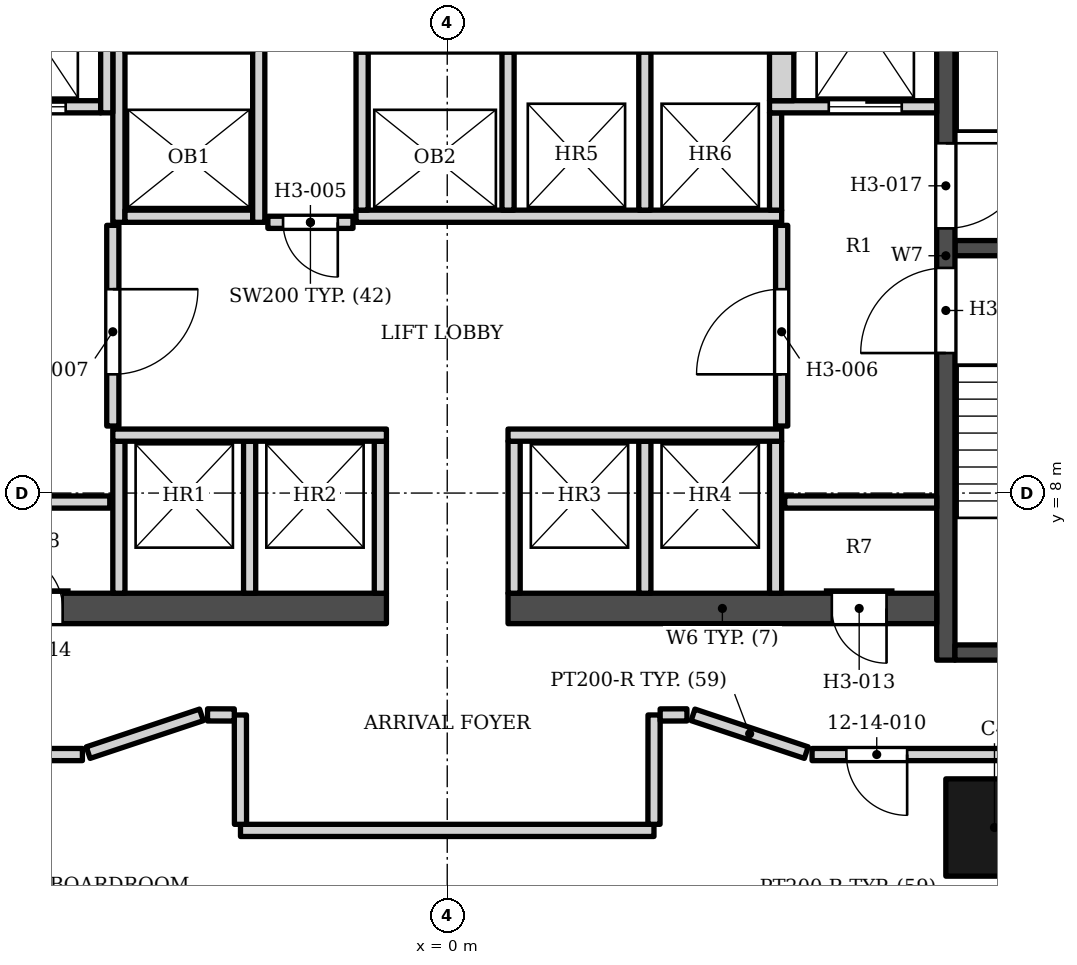
"""IFC4 building model, lengths in metres.
Left out: names, types, materials, properties, quantities, classifications, styles, units other than length and angle.
Written with IfcOpenShell. Run it as: python <this file> out.ifc"""

import sys

from ifc_helpers import new_model, si_unit, direction, frame, frame_2d, origin, origin_2d, place, context, subcontext, project, spatial, rectangle, extrude, element, fill, save


model = new_model("IFC4")
c1 = context("Model", 3, precision=1e-05, world=origin(), true_north=direction((0.0, 1.0)))
c2 = subcontext(c1, "Body", "Model", "MODEL_VIEW")
j1 = project(units=[si_unit("LENGTHUNIT", "METRE"), si_unit("PLANEANGLEUNIT", "RADIAN")], contexts=[c1])
p1 = place(None, origin())
s1 = spatial("IfcSite", under=j1, at=p1, CompositionType="ELEMENT")
p2 = place(p1, origin())
s2 = spatial("IfcBuilding", under=s1, at=p2, CompositionType="ELEMENT")
p3 = place(p2, frame((0.0, 0.0, 66.4)))
s3 = spatial("IfcBuildingStorey", under=s2, at=p3, CompositionType="ELEMENT", Elevation=66.4)
p4 = place(p3, frame((8.2, 5.253, 0.0), z_axis=(0.0, 0.0, 1.0), x_axis=(0.0, 1.0, 0.0)))
e1 = element("IfcWall", 1, at=p4, inside=s3, PredefinedType="SHEAR", context=c2, shape_type="SweptSolid", body=[
    extrude(rectangle(XDim=13.3, YDim=0.3, at=frame_2d((6.65, 0.0))), origin(), (0.0, 0.0, 1.0), 3.4),
])
p5 = place(p4, frame((7.1, 0.0, 0.0)))
e2 = element("IfcOpeningElement", 2, at=p5, cuts=e1, PredefinedType="OPENING", context=c2, shape_type="SweptSolid", body=[
    extrude(rectangle(XDim=1.4, YDim=2.1, at=frame_2d((0.7, 1.05))), frame((0.0, 0.16, 0.0), z_axis=(0.0, -1.0, 0.0), x_axis=(1.0, 0.0, 0.0)), (0.0, 0.0, 1.0), 0.32),
])
p6 = place(p4, frame((5.05, 0.0, 0.0)))
e3 = element("IfcOpeningElement", 3, at=p6, cuts=e1, PredefinedType="OPENING", context=c2, shape_type="SweptSolid", body=[
    extrude(rectangle(XDim=1.4, YDim=2.1, at=frame_2d((0.7, 1.05))), frame((0.0, 0.16, 0.0), z_axis=(0.0, -1.0, 0.0), x_axis=(1.0, 0.0, 0.0)), (0.0, 0.0, 1.0), 0.32),
])
for number, where, z_axis, x_axis in (
    (4, (8.35, 12.028, 0.0), (0.0, 0.0, 1.0), (1.0, 0.0, 0.0)),
    (5, (8.35, 5.378, 0.0), (0.0, 0.0, 1.0), (1.0, 0.0, 0.0)),
):
    element("IfcWall", number, at=place(p3, frame(where, z_axis=z_axis, x_axis=x_axis)), inside=s3, PredefinedType="SHEAR", context=c2, shape_type="SweptSolid", body=[
        extrude(rectangle(XDim=3.75, YDim=0.25, at=frame_2d((1.875, 0.0))), origin(), (0.0, 0.0, 1.0), 3.4),
    ])
p7 = place(p3, frame((-8.05, 6.103, 0.0), z_axis=(0.0, 0.0, 1.0), x_axis=(1.0, 0.0, 0.0)))
e6 = element("IfcWall", 6, at=p7, inside=s3, PredefinedType="SHEAR", context=c2, shape_type="SweptSolid", body=[
    extrude(rectangle(XDim=7.05, YDim=0.5, at=frame_2d((3.525, 0.0))), origin(), (0.0, 0.0, 1.0), 3.4),
])
p8 = place(p7, frame((0.825, 0.0, 0.0)))
e7 = element("IfcOpeningElement", 7, at=p8, cuts=e6, PredefinedType="OPENING", context=c2, shape_type="SweptSolid", body=[
    extrude(rectangle(XDim=0.9, YDim=2.1, at=frame_2d((0.45, 1.05))), frame((0.0, 0.26, 0.0), z_axis=(0.0, -1.0, 0.0), x_axis=(1.0, 0.0, 0.0)), (0.0, 0.0, 1.0), 0.52),
])
p9 = place(p3, frame((1.0, 6.103, 0.0), z_axis=(0.0, 0.0, 1.0), x_axis=(1.0, 0.0, 0.0)))
e8 = element("IfcWall", 8, at=p9, inside=s3, PredefinedType="SHEAR", context=c2, shape_type="SweptSolid", body=[
    extrude(rectangle(XDim=7.05, YDim=0.5, at=frame_2d((3.525, 0.0))), origin(), (0.0, 0.0, 1.0), 3.4),
])
p10 = place(p9, frame((5.325, 0.0, 0.0)))
e9 = element("IfcOpeningElement", 9, at=p10, cuts=e8, PredefinedType="OPENING", context=c2, shape_type="SweptSolid", body=[
    extrude(rectangle(XDim=0.9, YDim=2.1, at=frame_2d((0.45, 1.05))), frame((0.0, 0.26, 0.0), z_axis=(0.0, -1.0, 0.0), x_axis=(1.0, 0.0, 0.0)), (0.0, 0.0, 1.0), 0.52),
])
p11 = place(p3, frame((9.0, 2.5, 0.0), z_axis=(0.0, 0.0, 1.0), x_axis=(1.0, 0.0, 0.0)))
e10 = element("IfcColumn", 10, at=p11, inside=s3, PredefinedType="COLUMN", context=c2, shape_type="SweptSolid", body=[
    extrude(rectangle(XDim=1.6, YDim=1.6, at=origin_2d()), origin(), (0.0, 0.0, 1.0), 3.4),
])
for number, where, z_axis, x_axis in (
    (11, (-5.4, 6.353, 0.0), (0.0, 0.0, 1.0), (0.0, 1.0, 0.0)),
    (12, (-3.25, 6.353, 0.0), (0.0, 0.0, 1.0), (0.0, 1.0, 0.0)),
    (13, (-1.1, 6.353, 0.0), (0.0, 0.0, 1.0), (0.0, 1.0, 0.0)),
    (14, (1.1, 6.353, 0.0), (0.0, 0.0, 1.0), (0.0, 1.0, 0.0)),
    (15, (3.25, 6.353, 0.0), (0.0, 0.0, 1.0), (0.0, 1.0, 0.0)),
    (16, (5.4, 6.353, 0.0), (0.0, 0.0, 1.0), (0.0, 1.0, 0.0)),
    (17, (-8.05, 7.853, 0.0), (0.0, 0.0, 1.0), (1.0, 0.0, 0.0)),
    (18, (5.55, 7.853, 0.0), (0.0, 0.0, 1.0), (1.0, 0.0, 0.0)),
):
    element("IfcWall", number, at=place(p3, frame(where, z_axis=z_axis, x_axis=x_axis)), inside=s3, PredefinedType="SOLIDWALL", context=c2, shape_type="SweptSolid", body=[
        extrude(rectangle(XDim=2.5, YDim=0.2, at=frame_2d((1.25, 0.0))), origin(), (0.0, 0.0, 1.0), 3.23),
    ])
for number, where, z_axis, x_axis in (
    (19, (-5.5, 8.953, 0.0), (0.0, 0.0, 1.0), (1.0, 0.0, 0.0)),
    (20, (1.0, 8.953, 0.0), (0.0, 0.0, 1.0), (1.0, 0.0, 0.0)),
):
    element("IfcWall", number, at=place(p3, frame(where, z_axis=z_axis, x_axis=x_axis)), inside=s3, PredefinedType="SOLIDWALL", context=c2, shape_type="SweptSolid", body=[
        extrude(rectangle(XDim=4.5, YDim=0.2, at=frame_2d((2.25, 0.0))), origin(), (0.0, 0.0, 1.0), 3.23),
    ])
p12 = place(p3, frame((-5.5, 9.103, 0.0), z_axis=(0.0, 0.0, 1.0), x_axis=(0.0, 1.0, 0.0)))
e21 = element("IfcWall", 21, at=p12, inside=s3, PredefinedType="SOLIDWALL", context=c2, shape_type="SweptSolid", body=[
    extrude(rectangle(XDim=3.3, YDim=0.2, at=frame_2d((1.65, 0.0))), origin(), (0.0, 0.0, 1.0), 3.23),
])
p13 = place(p12, frame((0.85, 0.0, 0.0)))
e22 = element("IfcOpeningElement", 22, at=p13, cuts=e21, PredefinedType="OPENING", context=c2, shape_type="SweptSolid", body=[
    extrude(rectangle(XDim=1.4, YDim=2.1, at=frame_2d((0.7, 1.05))), frame((0.0, 0.11, 0.0), z_axis=(0.0, -1.0, 0.0), x_axis=(1.0, 0.0, 0.0)), (0.0, 0.0, 1.0), 0.22),
])
p14 = place(p3, frame((5.5, 9.103, 0.0), z_axis=(0.0, 0.0, 1.0), x_axis=(0.0, 1.0, 0.0)))
e23 = element("IfcWall", 23, at=p14, inside=s3, PredefinedType="SOLIDWALL", context=c2, shape_type="SweptSolid", body=[
    extrude(rectangle(XDim=3.3, YDim=0.2, at=frame_2d((1.65, 0.0))), origin(), (0.0, 0.0, 1.0), 3.23),
])
p15 = place(p14, frame((0.85, 0.0, 0.0)))
e24 = element("IfcOpeningElement", 24, at=p15, cuts=e23, PredefinedType="OPENING", context=c2, shape_type="SweptSolid", body=[
    extrude(rectangle(XDim=1.4, YDim=2.1, at=frame_2d((0.7, 1.05))), frame((0.0, 0.11, 0.0), z_axis=(0.0, -1.0, 0.0), x_axis=(1.0, 0.0, 0.0)), (0.0, 0.0, 1.0), 0.22),
])
p16 = place(p3, frame((-2.95, 12.453, 0.0), z_axis=(0.0, 0.0, 1.0), x_axis=(1.0, 0.0, 0.0)))
e25 = element("IfcWall", 25, at=p16, inside=s3, PredefinedType="SOLIDWALL", context=c2, shape_type="SweptSolid", body=[
    extrude(rectangle(XDim=1.4, YDim=0.2, at=frame_2d((0.7, 0.0))), origin(), (0.0, 0.0, 1.0), 3.23),
])
p17 = place(p16, frame((0.25, 0.0, 0.0)))
e26 = element("IfcOpeningElement", 26, at=p17, cuts=e25, PredefinedType="OPENING", context=c2, shape_type="SweptSolid", body=[
    extrude(rectangle(XDim=0.9, YDim=2.1, at=frame_2d((0.45, 1.05))), frame((0.0, 0.11, 0.0), z_axis=(0.0, -1.0, 0.0), x_axis=(1.0, 0.0, 0.0)), (0.0, 0.0, 1.0), 0.22),
])
p18 = place(p3, frame((-5.4, 12.453, 0.0), z_axis=(0.0, 0.0, 1.0), x_axis=(0.0, 1.0, 0.0)))
e27 = element("IfcWall", 27, at=p18, inside=s3, PredefinedType="SOLIDWALL", context=c2, shape_type="SweptSolid", body=[
    extrude(rectangle(XDim=3.0, YDim=0.2, at=frame_2d((1.5, 0.0))), origin(), (0.0, 0.0, 1.0), 3.23),
])
p19 = place(p3, frame((-5.3, 12.552, 0.0), z_axis=(0.0, 0.0, 1.0), x_axis=(1.0, 0.0, 0.0)))
e28 = element("IfcWall", 28, at=p19, inside=s3, PredefinedType="SOLIDWALL", context=c2, shape_type="SweptSolid", body=[
    extrude(rectangle(XDim=2.1, YDim=0.2, at=frame_2d((1.05, 0.0))), origin(), (0.0, 0.0, 1.0), 3.23),
])
p20 = place(p3, frame((-3.1, 12.453, 0.0), z_axis=(0.0, 0.0, 1.0), x_axis=(0.0, 1.0, 0.0)))
e29 = element("IfcWall", 29, at=p20, inside=s3, PredefinedType="SOLIDWALL", context=c2, shape_type="SweptSolid", body=[
    extrude(rectangle(XDim=3.0, YDim=0.2, at=frame_2d((1.5, 0.0))), origin(), (0.0, 0.0, 1.0), 3.23),
])
p21 = place(p3, frame((-1.5, 12.552, 0.0), z_axis=(0.0, 0.0, 1.0), x_axis=(1.0, 0.0, 0.0)))
e30 = element("IfcWall", 30, at=p21, inside=s3, PredefinedType="SOLIDWALL", context=c2, shape_type="SweptSolid", body=[
    extrude(rectangle(XDim=7.0, YDim=0.2, at=frame_2d((3.5, 0.0))), origin(), (0.0, 0.0, 1.0), 3.23),
])
for number, where, z_axis, x_axis in (
    (31, (-1.4, 12.653, 0.0), (0.0, 0.0, 1.0), (0.0, 1.0, 0.0)),
    (32, (1.0, 12.653, 0.0), (0.0, 0.0, 1.0), (0.0, 1.0, 0.0)),
    (33, (3.25, 12.653, 0.0), (0.0, 0.0, 1.0), (0.0, 1.0, 0.0)),
):
    element("IfcWall", number, at=place(p3, frame(where, z_axis=z_axis, x_axis=x_axis)), inside=s3, PredefinedType="SOLIDWALL", context=c2, shape_type="SweptSolid", body=[
        extrude(rectangle(XDim=2.6, YDim=0.2, at=frame_2d((1.3, 0.0))), origin(), (0.0, 0.0, 1.0), 3.23),
    ])
p22 = place(p3, frame((5.4, 12.653, 0.0), z_axis=(0.0, 0.0, 1.0), x_axis=(0.0, 1.0, 0.0)))
e34 = element("IfcWall", 34, at=p22, inside=s3, PredefinedType="SOLIDWALL", context=c2, shape_type="SweptSolid", body=[
    extrude(rectangle(XDim=1.6, YDim=0.2, at=frame_2d((0.8, 0.0))), origin(), (0.0, 0.0, 1.0), 3.23),
])
p23 = place(p3, frame((-8.05, 14.353, 0.0), z_axis=(0.0, 0.0, 1.0), x_axis=(1.0, 0.0, 0.0)))
e35 = element("IfcWall", 35, at=p23, inside=s3, PredefinedType="SOLIDWALL", context=c2, shape_type="SweptSolid", body=[
    extrude(rectangle(XDim=2.35, YDim=0.2, at=frame_2d((1.175, 0.0))), origin(), (0.0, 0.0, 1.0), 3.23),
])
p24 = place(p23, frame((0.575, 0.0, 0.0)))
e36 = element("IfcOpeningElement", 36, at=p24, cuts=e35, PredefinedType="OPENING", context=c2, shape_type="SweptSolid", body=[
    extrude(rectangle(XDim=1.2, YDim=2.1, at=frame_2d((0.6, 1.05))), frame((0.0, 0.11, 0.0), z_axis=(0.0, -1.0, 0.0), x_axis=(1.0, 0.0, 0.0)), (0.0, 0.0, 1.0), 0.22),
])
p25 = place(p3, frame((-5.6, 14.253, 0.0), z_axis=(0.0, 0.0, 1.0), x_axis=(0.0, 1.0, 0.0)))
e37 = element("IfcWall", 37, at=p25, inside=s3, PredefinedType="SOLIDWALL", context=c2, shape_type="SweptSolid", body=[
    extrude(rectangle(XDim=4.3, YDim=0.2, at=frame_2d((2.15, 0.0))), origin(), (0.0, 0.0, 1.0), 3.23),
])
p26 = place(p3, frame((5.3, 14.353, 0.0), z_axis=(0.0, 0.0, 1.0), x_axis=(1.0, 0.0, 0.0)))
e38 = element("IfcWall", 38, at=p26, inside=s3, PredefinedType="SOLIDWALL", context=c2, shape_type="SweptSolid", body=[
    extrude(rectangle(XDim=2.75, YDim=0.2, at=frame_2d((1.375, 0.0))), origin(), (0.0, 0.0, 1.0), 3.23),
])
p27 = place(p26, frame((0.975, 0.0, 0.0)))
e39 = element("IfcOpeningElement", 39, at=p27, cuts=e38, PredefinedType="OPENING", context=c2, shape_type="SweptSolid", body=[
    extrude(rectangle(XDim=1.2, YDim=2.1, at=frame_2d((0.6, 1.05))), frame((0.0, 0.11, 0.0), z_axis=(0.0, -1.0, 0.0), x_axis=(1.0, 0.0, 0.0)), (0.0, 0.0, 1.0), 0.22),
])
p28 = place(p3, frame((5.5, 14.453, 0.0), z_axis=(0.0, 0.0, 1.0), x_axis=(0.0, 1.0, 0.0)))
e40 = element("IfcWall", 40, at=p28, inside=s3, PredefinedType="SOLIDWALL", context=c2, shape_type="SweptSolid", body=[
    extrude(rectangle(XDim=0.8, YDim=0.4, at=frame_2d((0.4, 0.0))), origin(), (0.0, 0.0, 1.0), 3.23),
])
p29 = place(p3, frame((-5.3, 15.353, 0.0), z_axis=(0.0, 0.0, 1.0), x_axis=(1.0, 0.0, 0.0)))
e41 = element("IfcWall", 41, at=p29, inside=s3, PredefinedType="SOLIDWALL", context=c2, shape_type="SweptSolid", body=[
    extrude(rectangle(XDim=2.1, YDim=0.2, at=frame_2d((1.05, 0.0))), origin(), (0.0, 0.0, 1.0), 3.23),
])
p30 = place(p3, frame((-1.5, 15.353, 0.0), z_axis=(0.0, 0.0, 1.0), x_axis=(1.0, 0.0, 0.0)))
e42 = element("IfcWall", 42, at=p30, inside=s3, PredefinedType="SOLIDWALL", context=c2, shape_type="SweptSolid", body=[
    extrude(rectangle(XDim=7.2, YDim=0.2, at=frame_2d((3.6, 0.0))), origin(), (0.0, 0.0, 1.0), 3.23),
])
p31 = place(p3, frame((-12.043, 2.017, 0.0), z_axis=(0.0, 0.0, 1.0), x_axis=(0.5000018851, -0.866024315419, 0.0)))
e43 = element("IfcWall", 43, at=p31, inside=s3, PredefinedType="PARTITIONING", context=c2, shape_type="SweptSolid", body=[
    extrude(rectangle(XDim=18.0, YDim=0.2, at=frame_2d((9.0, 0.0))), origin(), (0.0, 0.0, 1.0), 2.374),
])
p32 = place(p31, frame((5.95, 0.0, 0.0)))
e44 = element("IfcOpeningElement", 44, at=p32, cuts=e43, PredefinedType="OPENING", context=c2, shape_type="SweptSolid", body=[
    extrude(rectangle(XDim=1.6, YDim=2.1, at=frame_2d((0.8, 1.05))), frame((0.0, 0.11, 0.0), z_axis=(0.0, -1.0, 0.0), x_axis=(1.0, 0.0, 0.0)), (0.0, 0.0, 1.0), 0.22),
])
p33 = place(p31, frame((14.0, 0.0, 0.0)))
e45 = element("IfcOpeningElement", 45, at=p33, cuts=e43, PredefinedType="OPENING", context=c2, shape_type="SweptSolid", body=[
    extrude(rectangle(XDim=1.1, YDim=2.1, at=frame_2d((0.55, 1.05))), frame((0.0, 0.11, 0.0), z_axis=(0.0, -1.0, 0.0), x_axis=(1.0, 0.0, 0.0)), (0.0, 0.0, 1.0), 0.22),
])
p34 = place(p3, frame((8.824, -0.617, 0.0), z_axis=(0.0, 0.0, 1.0), x_axis=(0.500271769931, 0.865868440475, 0.0)))
e46 = element("IfcWall", 46, at=p34, inside=s3, PredefinedType="PARTITIONING", context=c2, shape_type="SweptSolid", body=[
    extrude(rectangle(XDim=4.885, YDim=0.2, at=frame_2d((2.443, 0.0))), origin(), (0.0, 0.0, 1.0), 2.552),
])
p35 = place(p3, frame((-3.4, 2.452, 0.0), z_axis=(0.0, 0.0, 1.0), x_axis=(1.0, 0.0, 0.0)))
e47 = element("IfcWall", 47, at=p35, inside=s3, PredefinedType="PARTITIONING", context=c2, shape_type="SweptSolid", body=[
    extrude(rectangle(XDim=6.8, YDim=0.2, at=frame_2d((3.4, 0.0))), origin(), (0.0, 0.0, 1.0), 2.474),
])
p36 = place(p3, frame((-3.402, 4.351, 0.0), z_axis=(0.0, 0.0, 1.0), x_axis=(0.001086217961, -0.999999410065, 0.0)))
e48 = element("IfcWall", 48, at=p36, inside=s3, PredefinedType="PARTITIONING", context=c2, shape_type="SweptSolid", body=[
    extrude(rectangle(XDim=1.798, YDim=0.2, at=frame_2d((0.899, 0.0))), origin(), (0.0, 0.0, 1.0), 3.23),
])
p37 = place(p3, frame((2.686, -14.257, 0.0), z_axis=(0.0, 0.0, 1.0), x_axis=(0.49998850195, 0.866032042085, 0.0)))
e49 = element("IfcWall", 49, at=p37, inside=s3, PredefinedType="PARTITIONING", context=c2, shape_type="SweptSolid", body=[
    extrude(rectangle(XDim=20.6, YDim=0.2, at=frame_2d((10.3, 0.0))), origin(), (0.0, 0.0, 1.0), 2.302),
])
p38 = place(p37, frame((9.7, 0.0, 0.0)))
e50 = element("IfcOpeningElement", 50, at=p38, cuts=e49, PredefinedType="OPENING", context=c2, shape_type="SweptSolid", body=[
    extrude(rectangle(XDim=1.1, YDim=2.1, at=frame_2d((0.55, 1.05))), frame((0.0, 0.11, 0.0), z_axis=(0.0, -1.0, 0.0), x_axis=(1.0, 0.0, 0.0)), (0.0, 0.0, 1.0), 0.22),
])
p39 = place(p37, frame((15.6, 0.0, 0.0)))
e51 = element("IfcOpeningElement", 51, at=p39, cuts=e49, PredefinedType="OPENING", context=c2, shape_type="SweptSolid", body=[
    extrude(rectangle(XDim=1.0, YDim=2.1, at=frame_2d((0.5, 1.05))), frame((0.0, 0.11, 0.0), z_axis=(0.0, -1.0, 0.0), x_axis=(1.0, 0.0, 0.0)), (0.0, 0.0, 1.0), 0.22),
])
p40 = place(p3, frame((-11.28, 3.7, 0.0), z_axis=(0.0, 0.0, 1.0), x_axis=(1.0, 0.0, 0.0)))
e52 = element("IfcWall", 52, at=p40, inside=s3, PredefinedType="PARTITIONING", context=c2, shape_type="SweptSolid", body=[
    extrude(rectangle(XDim=5.28, YDim=0.2, at=frame_2d((2.64, 0.0))), origin(), (0.0, 0.0, 1.0), 2.832),
])
p41 = place(p3, frame((6.0, 3.7, 0.0), z_axis=(0.0, 0.0, 1.0), x_axis=(1.0, 0.0, 0.0)))
e53 = element("IfcWall", 53, at=p41, inside=s3, PredefinedType="PARTITIONING", context=c2, shape_type="SweptSolid", body=[
    extrude(rectangle(XDim=5.319, YDim=0.2, at=frame_2d((2.659, 0.0))), origin(), (0.0, 0.0, 1.0), 2.832),
])
p42 = place(p41, frame((0.564, 0.0, 0.0)))
e54 = element("IfcOpeningElement", 54, at=p42, cuts=e53, PredefinedType="OPENING", context=c2, shape_type="SweptSolid", body=[
    extrude(rectangle(XDim=1.0, YDim=2.1, at=frame_2d((0.5, 1.05))), frame((0.0, 0.11, 0.0), z_axis=(0.0, -1.0, 0.0), x_axis=(1.0, 0.0, 0.0)), (0.0, 0.0, 1.0), 0.22),
])
p43 = place(p41, frame((3.95, 0.0, 0.0)))
e55 = element("IfcOpeningElement", 55, at=p43, cuts=e53, PredefinedType="OPENING", context=c2, shape_type="SweptSolid", body=[
    extrude(rectangle(XDim=1.0, YDim=2.1, at=frame_2d((0.5, 1.05))), frame((0.0, 0.11, 0.0), z_axis=(0.0, -1.0, 0.0), x_axis=(1.0, 0.0, 0.0)), (0.0, 0.0, 1.0), 0.22),
])
for number, where, z_axis, x_axis in (
    (56, (4.042, 4.352, 0.0), (0.0, 0.0, 1.0), (0.949, -0.316, 0.0)),
    (57, (-5.905, 3.731, 0.0), (0.0, 0.0, 1.0), (0.949, 0.316, 0.0)),
):
    element("IfcWall", number, at=place(p3, frame(where, z_axis=z_axis, x_axis=x_axis)), inside=s3, PredefinedType="PARTITIONING", context=c2, shape_type="SweptSolid", body=[
        extrude(rectangle(XDim=1.964, YDim=0.2, at=frame_2d((0.982, 0.0))), origin(), (0.0, 0.0, 1.0), 2.384),
    ])
p44 = place(p3, frame((-3.942, 4.352, 0.0), z_axis=(0.0, 0.0, 1.0), x_axis=(0.999996159087, -0.00277160798, 0.0)))
e58 = element("IfcWall", 58, at=p44, inside=s3, PredefinedType="PARTITIONING", context=c2, shape_type="SweptSolid", body=[
    extrude(rectangle(XDim=0.44, YDim=0.2, at=frame_2d((0.22, 0.0))), origin(), (0.0, 0.0, 1.0), 3.23),
])
p45 = place(p3, frame((3.4, 2.552, 0.0), z_axis=(0.0, 0.0, 1.0), x_axis=(0.001086217961, 0.999999410065, 0.0)))
e59 = element("IfcWall", 59, at=p45, inside=s3, PredefinedType="PARTITIONING", context=c2, shape_type="SweptSolid", body=[
    extrude(rectangle(XDim=1.798, YDim=0.2, at=frame_2d((0.899, 0.0))), origin(), (0.0, 0.0, 1.0), 3.23),
])
p46 = place(p3, frame((3.502, 4.351, 0.0), z_axis=(0.0, 0.0, 1.0), x_axis=(0.999996159087, 0.00277160798, 0.0)))
e60 = element("IfcWall", 60, at=p46, inside=s3, PredefinedType="PARTITIONING", context=c2, shape_type="SweptSolid", body=[
    extrude(rectangle(XDim=0.44, YDim=0.2, at=frame_2d((0.22, 0.0))), origin(), (0.0, 0.0, 1.0), 3.23),
])
p47 = place(p24, origin())
e61 = element("IfcDoor", 61, at=p47, inside=s3, OperationType="DOUBLE_DOOR_SLIDING", PredefinedType="DOOR", context=c2, shape_type="SweptSolid", body=[
    extrude(rectangle(XDim=1.2, YDim=2.1, at=frame_2d((0.6, 1.05))), frame((0.0, 0.025, 0.0), z_axis=(0.0, -1.0, 0.0), x_axis=(1.0, 0.0, 0.0)), (0.0, 0.0, 1.0), 0.05),
])
fill(e36, e61)
p48 = place(p27, origin())
e62 = element("IfcDoor", 62, at=p48, inside=s3, OperationType="DOUBLE_DOOR_SLIDING", PredefinedType="DOOR", context=c2, shape_type="SweptSolid", body=[
    extrude(rectangle(XDim=1.2, YDim=2.1, at=frame_2d((0.6, 1.05))), frame((0.0, 0.025, 0.0), z_axis=(0.0, -1.0, 0.0), x_axis=(1.0, 0.0, 0.0)), (0.0, 0.0, 1.0), 0.05),
])
fill(e39, e62)
p49 = place(p5, origin())
e63 = element("IfcDoor", 63, at=p49, inside=s3, OperationType="SINGLE_SWING_RIGHT", PredefinedType="DOOR", context=c2, shape_type="SweptSolid", body=[
    extrude(rectangle(XDim=1.4, YDim=2.1, at=frame_2d((0.7, 1.05))), frame((0.0, 0.025, 0.0), z_axis=(0.0, -1.0, 0.0), x_axis=(1.0, 0.0, 0.0)), (0.0, 0.0, 1.0), 0.05),
])
fill(e2, e63)
p50 = place(p6, origin())
e64 = element("IfcDoor", 64, at=p50, inside=s3, OperationType="SINGLE_SWING_LEFT", PredefinedType="DOOR", context=c2, shape_type="SweptSolid", body=[
    extrude(rectangle(XDim=1.4, YDim=2.1, at=frame_2d((0.7, 1.05))), frame((0.0, 0.025, 0.0), z_axis=(0.0, -1.0, 0.0), x_axis=(1.0, 0.0, 0.0)), (0.0, 0.0, 1.0), 0.05),
])
fill(e3, e64)
p51 = place(p17, origin())
e65 = element("IfcDoor", 65, at=p51, inside=s3, OperationType="SINGLE_SWING_RIGHT", PredefinedType="DOOR", context=c2, shape_type="SweptSolid", body=[
    extrude(rectangle(XDim=0.9, YDim=2.1, at=frame_2d((0.45, 1.05))), frame((0.0, 0.025, 0.0), z_axis=(0.0, -1.0, 0.0), x_axis=(1.0, 0.0, 0.0)), (0.0, 0.0, 1.0), 0.05),
])
fill(e26, e65)
p52 = place(p13, origin())
e66 = element("IfcDoor", 66, at=p52, inside=s3, OperationType="SINGLE_SWING_RIGHT", PredefinedType="DOOR", context=c2, shape_type="SweptSolid", body=[
    extrude(rectangle(XDim=1.4, YDim=2.1, at=frame_2d((0.7, 1.05))), frame((0.0, 0.025, 0.0), z_axis=(0.0, -1.0, 0.0), x_axis=(1.0, 0.0, 0.0)), (0.0, 0.0, 1.0), 0.05),
])
fill(e22, e66)
p53 = place(p15, origin())
e67 = element("IfcDoor", 67, at=p53, inside=s3, OperationType="SINGLE_SWING_LEFT", PredefinedType="DOOR", context=c2, shape_type="SweptSolid", body=[
    extrude(rectangle(XDim=1.4, YDim=2.1, at=frame_2d((0.7, 1.05))), frame((0.0, 0.025, 0.0), z_axis=(0.0, -1.0, 0.0), x_axis=(1.0, 0.0, 0.0)), (0.0, 0.0, 1.0), 0.05),
])
fill(e24, e67)
p54 = place(p8, origin())
e68 = element("IfcDoor", 68, at=p54, inside=s3, OperationType="SINGLE_SWING_LEFT", PredefinedType="DOOR", context=c2, shape_type="SweptSolid", body=[
    extrude(rectangle(XDim=0.9, YDim=2.1, at=frame_2d((0.45, 1.05))), frame((0.0, 0.025, 0.0), z_axis=(0.0, -1.0, 0.0), x_axis=(1.0, 0.0, 0.0)), (0.0, 0.0, 1.0), 0.05),
])
fill(e7, e68)
p55 = place(p10, origin())
e69 = element("IfcDoor", 69, at=p55, inside=s3, OperationType="SINGLE_SWING_RIGHT", PredefinedType="DOOR", context=c2, shape_type="SweptSolid", body=[
    extrude(rectangle(XDim=0.9, YDim=2.1, at=frame_2d((0.45, 1.05))), frame((0.0, 0.025, 0.0), z_axis=(0.0, -1.0, 0.0), x_axis=(1.0, 0.0, 0.0)), (0.0, 0.0, 1.0), 0.05),
])
fill(e9, e69)
p56 = place(p42, origin())
e70 = element("IfcDoor", 70, at=p56, inside=s3, OperationType="SINGLE_SWING_RIGHT", PredefinedType="DOOR", context=c2, shape_type="SweptSolid", body=[
    extrude(rectangle(XDim=1.0, YDim=2.1, at=frame_2d((0.5, 1.05))), frame((0.0, 0.025, 0.0), z_axis=(0.0, -1.0, 0.0), x_axis=(1.0, 0.0, 0.0)), (0.0, 0.0, 1.0), 0.05),
])
fill(e54, e70)
save(model, sys.argv[1])
